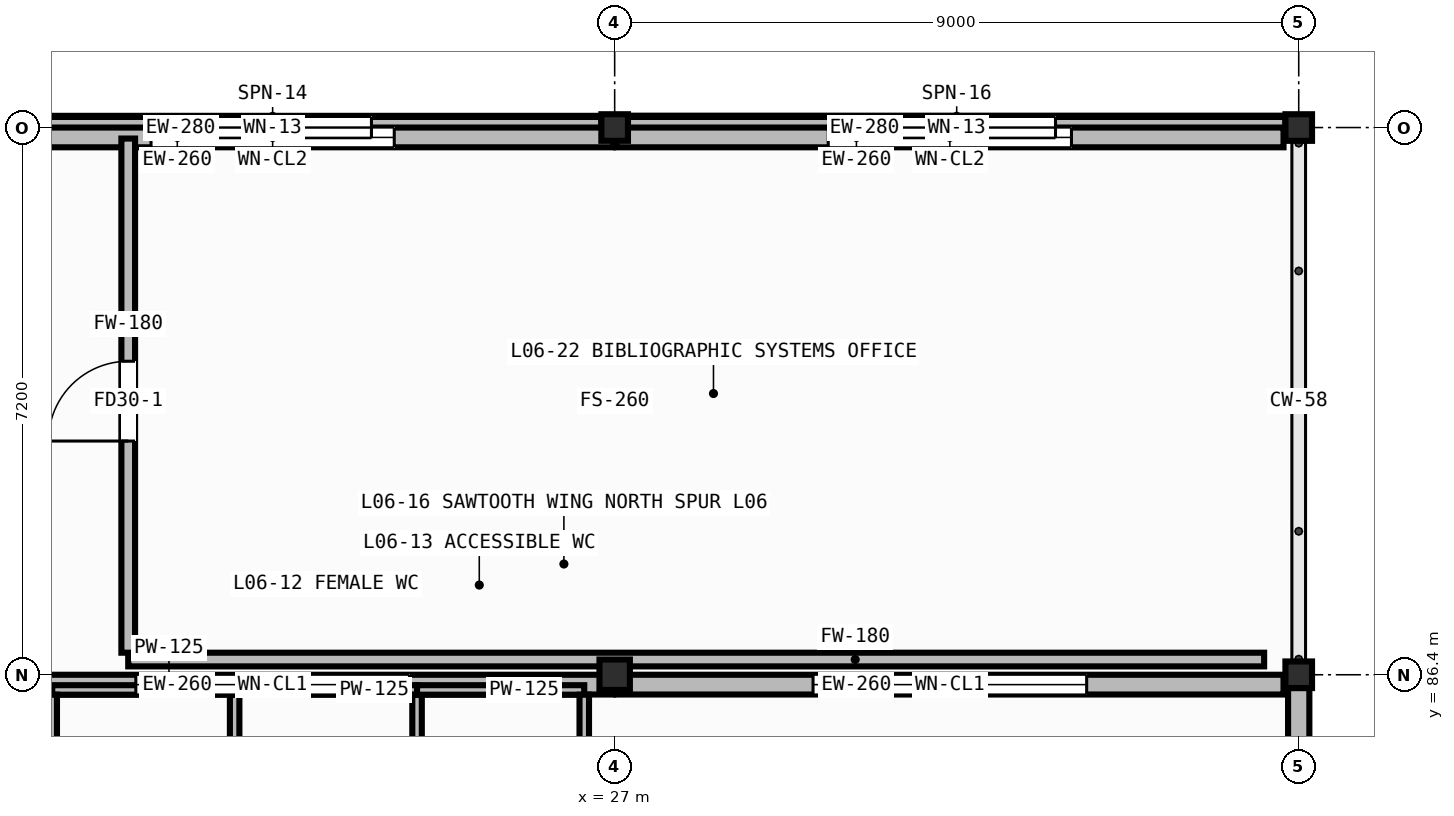
"""IFC4 building model, lengths in metres.
Left out: names, types, materials, properties, quantities, classifications, styles, units other than length and angle.
Written with IfcOpenShell. Run it as: python <this file> out.ifc"""

import sys

from ifc_helpers import new_model, si_unit, direction, frame, frame_2d, origin, origin_2d, place, context, subcontext, project, spatial, rectangle, hollow_rectangle, extrude, element, fill, save


model = new_model("IFC4")
c1 = context("Model", 3, precision=1e-05, world=origin(), true_north=direction((0.0, 1.0)))
c2 = subcontext(c1, "Body", "Model", "MODEL_VIEW")
j1 = project(units=[si_unit("LENGTHUNIT", "METRE"), si_unit("PLANEANGLEUNIT", "RADIAN")], contexts=[c1])
p1 = place(None, origin())
s1 = spatial("IfcSite", under=j1, at=p1, CompositionType="ELEMENT")
p2 = place(p1, origin())
s2 = spatial("IfcBuilding", under=s1, at=p2, CompositionType="ELEMENT")
p3 = place(p2, frame((0.0, 0.0, 20.6)))
s3 = spatial("IfcBuildingStorey", under=s2, at=p3, CompositionType="ELEMENT", Elevation=20.6)
p4 = place(p3, frame((27.0, 86.4, 0.0), z_axis=(0.0, 0.0, 1.0), x_axis=(1.0, 0.0, 0.0)))
e1 = element("IfcColumn", 1, at=p4, inside=s3, PredefinedType="COLUMN", context=c2, shape_type="SweptSolid", body=[
    extrude(hollow_rectangle(XDim=0.4, YDim=0.4, WallThickness=0.016, at=origin_2d()), origin(), (0.0, 0.0, 1.0), 3.18),
])
for number, where, z_axis, x_axis in (
    (2, (27.0, 93.6, 0.0), (0.0, 0.0, 1.0), (1.0, 0.0, 0.0)),
    (3, (36.0, 86.4, 0.0), (0.0, 0.0, 1.0), (1.0, 0.0, 0.0)),
    (4, (36.0, 93.6, 0.0), (0.0, 0.0, 1.0), (1.0, 0.0, 0.0)),
):
    element("IfcColumn", number, at=place(p3, frame(where, z_axis=z_axis, x_axis=x_axis)), inside=s3, PredefinedType="COLUMN", context=c2, shape_type="SweptSolid", body=[
        extrude(hollow_rectangle(XDim=0.35, YDim=0.35, WallThickness=0.012, at=origin_2d()), origin(), (0.0, 0.0, 1.0), 3.18),
    ])
p5 = place(p3, frame((26.825, 93.6, 0.0), z_axis=(0.0, 0.0, 1.0), x_axis=(-1.0, 0.0, 0.0)))
e5 = element("IfcWall", 5, at=p5, inside=s3, PredefinedType="STANDARD", context=c2, shape_type="SweptSolid", body=[
    extrude(rectangle(XDim=8.65, YDim=0.28, at=frame_2d((4.325, 0.0))), origin(), (0.0, 0.0, 1.0), 2.78),
])
p6 = place(p5, frame((3.025, 0.0, 0.85)))
e6 = element("IfcOpeningElement", 6, at=p6, cuts=e5, PredefinedType="OPENING", context=c2, shape_type="SweptSolid", body=[
    extrude(rectangle(XDim=2.6, YDim=1.6, at=frame_2d((1.3, 0.8))), frame((0.0, 0.152, 0.0), z_axis=(0.0, -1.0, 0.0), x_axis=(1.0, 0.0, 0.0)), (0.0, 0.0, 1.0), 0.304),
])
p7 = place(p3, frame((35.825, 93.6, 0.0), z_axis=(0.0, 0.0, 1.0), x_axis=(-1.0, 0.0, 0.0)))
e7 = element("IfcWall", 7, at=p7, inside=s3, PredefinedType="STANDARD", context=c2, shape_type="SweptSolid", body=[
    extrude(rectangle(XDim=8.65, YDim=0.28, at=frame_2d((4.325, 0.0))), origin(), (0.0, 0.0, 1.0), 2.78),
])
p8 = place(p7, frame((3.025, 0.0, 0.85)))
e8 = element("IfcOpeningElement", 8, at=p8, cuts=e7, PredefinedType="OPENING", context=c2, shape_type="SweptSolid", body=[
    extrude(rectangle(XDim=2.6, YDim=1.6, at=frame_2d((1.3, 0.8))), frame((0.0, 0.152, 0.0), z_axis=(0.0, -1.0, 0.0), x_axis=(1.0, 0.0, 0.0)), (0.0, 0.0, 1.0), 0.304),
])
p9 = place(p3, frame((36.0, 86.225, 0.0), z_axis=(0.0, 0.0, 1.0), x_axis=(0.0, -1.0, 0.0)))
e9 = element("IfcWall", 9, at=p9, inside=s3, PredefinedType="STANDARD", context=c2, shape_type="SweptSolid", body=[
    extrude(rectangle(XDim=6.85, YDim=0.28, at=frame_2d((3.425, 0.0))), origin(), (0.0, 0.0, 1.0), 2.78),
])
p10 = place(p3, frame((26.98, 86.27, 3.4), z_axis=(0.0, 0.0, 1.0), x_axis=(-1.0, 0.0, 0.0)))
e10 = element("IfcWall", 10, at=p10, inside=s3, PredefinedType="STANDARD", context=c2, shape_type="SweptSolid", body=[
    extrude(rectangle(XDim=8.96, YDim=0.26, at=frame_2d((4.48, 0.0))), origin(), (0.0, 0.0, 1.0), 2.05),
])
p11 = place(p10, frame((2.68, 0.0, 0.38)))
e11 = element("IfcOpeningElement", 11, at=p11, cuts=e10, PredefinedType="OPENING", context=c2, shape_type="SweptSolid", body=[
    extrude(rectangle(XDim=3.6, YDim=1.2, at=frame_2d((1.8, 0.6))), frame((0.0, 0.142, 0.0), z_axis=(0.0, -1.0, 0.0), x_axis=(1.0, 0.0, 0.0)), (0.0, 0.0, 1.0), 0.284),
])
p12 = place(p3, frame((35.8, 86.27, 3.4), z_axis=(0.0, 0.0, 1.0), x_axis=(-1.0, 0.0, 0.0)))
e12 = element("IfcWall", 12, at=p12, inside=s3, PredefinedType="STANDARD", context=c2, shape_type="SweptSolid", body=[
    extrude(rectangle(XDim=8.78, YDim=0.26, at=frame_2d((4.39, 0.0))), origin(), (0.0, 0.0, 1.0), 2.05),
])
p13 = place(p12, frame((2.59, 0.0, 0.38)))
e13 = element("IfcOpeningElement", 13, at=p13, cuts=e12, PredefinedType="OPENING", context=c2, shape_type="SweptSolid", body=[
    extrude(rectangle(XDim=3.6, YDim=1.2, at=frame_2d((1.8, 0.6))), frame((0.0, 0.142, 0.0), z_axis=(0.0, -1.0, 0.0), x_axis=(1.0, 0.0, 0.0)), (0.0, 0.0, 1.0), 0.284),
])
p14 = place(p3, frame((26.98, 93.47, 3.4), z_axis=(0.0, 0.0, 1.0), x_axis=(-1.0, 0.0, 0.0)))
e14 = element("IfcWall", 14, at=p14, inside=s3, PredefinedType="STANDARD", context=c2, shape_type="SweptSolid", body=[
    extrude(rectangle(XDim=8.96, YDim=0.26, at=frame_2d((4.48, 0.0))), origin(), (0.0, 0.0, 1.0), 2.05),
])
p15 = place(p14, frame((2.88, 0.0, 0.38)))
e15 = element("IfcOpeningElement", 15, at=p15, cuts=e14, PredefinedType="OPENING", context=c2, shape_type="SweptSolid", body=[
    extrude(rectangle(XDim=3.2, YDim=1.1, at=frame_2d((1.6, 0.55))), frame((0.0, 0.142, 0.0), z_axis=(0.0, -1.0, 0.0), x_axis=(1.0, 0.0, 0.0)), (0.0, 0.0, 1.0), 0.284),
])
p16 = place(p3, frame((35.8, 93.47, 3.4), z_axis=(0.0, 0.0, 1.0), x_axis=(-1.0, 0.0, 0.0)))
e16 = element("IfcWall", 16, at=p16, inside=s3, PredefinedType="STANDARD", context=c2, shape_type="SweptSolid", body=[
    extrude(rectangle(XDim=8.78, YDim=0.26, at=frame_2d((4.39, 0.0))), origin(), (0.0, 0.0, 1.0), 2.05),
])
p17 = place(p16, frame((2.79, 0.0, 0.38)))
e17 = element("IfcOpeningElement", 17, at=p17, cuts=e16, PredefinedType="OPENING", context=c2, shape_type="SweptSolid", body=[
    extrude(rectangle(XDim=3.2, YDim=1.1, at=frame_2d((1.6, 0.55))), frame((0.0, 0.142, 0.0), z_axis=(0.0, -1.0, 0.0), x_axis=(1.0, 0.0, 0.0)), (0.0, 0.0, 1.0), 0.284),
])
p18 = place(p3, frame((19.6, 86.2, 0.0), z_axis=(0.0, 0.0, 1.0), x_axis=(1.0, 0.0, 0.0)))
e18 = element("IfcWall", 18, at=p18, inside=s3, PredefinedType="PARTITIONING", context=c2, shape_type="SweptSolid", body=[
    extrude(rectangle(XDim=2.4, YDim=0.125, at=frame_2d((1.2, 0.0))), origin(), (0.0, 0.0, 1.0), 2.46),
])
for number, where, z_axis, x_axis in (
    (19, (19.6, 83.69, 0.0), (0.0, 0.0, 1.0), (0.0, 1.0, 0.0)),
    (20, (22.0, 83.69, 0.0), (0.0, 0.0, 1.0), (0.0, 1.0, 0.0)),
):
    element("IfcWall", number, at=place(p3, frame(where, z_axis=z_axis, x_axis=x_axis)), inside=s3, PredefinedType="PARTITIONING", context=c2, shape_type="SweptSolid", body=[
        extrude(rectangle(XDim=2.448, YDim=0.125, at=frame_2d((1.224, 0.0))), origin(), (0.0, 0.0, 1.0), 3.18),
    ])
p19 = place(p3, frame((22.0, 86.2, 0.0), z_axis=(0.0, 0.0, 1.0), x_axis=(1.0, 0.0, 0.0)))
e21 = element("IfcWall", 21, at=p19, inside=s3, PredefinedType="PARTITIONING", context=c2, shape_type="SweptSolid", body=[
    extrude(rectangle(XDim=2.4, YDim=0.125, at=frame_2d((1.2, 0.0))), origin(), (0.0, 0.0, 1.0), 2.46),
])
p20 = place(p3, frame((24.4, 83.69, 0.0), z_axis=(0.0, 0.0, 1.0), x_axis=(0.0, 1.0, 0.0)))
e22 = element("IfcWall", 22, at=p20, inside=s3, PredefinedType="PARTITIONING", context=c2, shape_type="SweptSolid", body=[
    extrude(rectangle(XDim=2.448, YDim=0.125, at=frame_2d((1.224, 0.0))), origin(), (0.0, 0.0, 1.0), 3.18),
])
p21 = place(p3, frame((24.4, 86.2, 0.0), z_axis=(0.0, 0.0, 1.0), x_axis=(1.0, 0.0, 0.0)))
e23 = element("IfcWall", 23, at=p21, inside=s3, PredefinedType="PARTITIONING", context=c2, shape_type="SweptSolid", body=[
    extrude(rectangle(XDim=2.2, YDim=0.125, at=frame_2d((1.1, 0.0))), origin(), (0.0, 0.0, 1.0), 2.46),
])
p22 = place(p3, frame((26.6, 83.69, 0.0), z_axis=(0.0, 0.0, 1.0), x_axis=(0.0, 1.0, 0.0)))
e24 = element("IfcWall", 24, at=p22, inside=s3, PredefinedType="PARTITIONING", context=c2, shape_type="SweptSolid", body=[
    extrude(rectangle(XDim=2.448, YDim=0.125, at=frame_2d((1.224, 0.0))), origin(), (0.0, 0.0, 1.0), 3.18),
])
p23 = place(p3, frame((20.6, 86.6, 0.0), z_axis=(0.0, 0.0, 1.0), x_axis=(1.0, 0.0, 0.0)))
e25 = element("IfcWall", 25, at=p23, inside=s3, PredefinedType="PARTITIONING", context=c2, shape_type="SweptSolid", body=[
    extrude(rectangle(XDim=14.945, YDim=0.18, at=frame_2d((7.472, 0.0))), origin(), (0.0, 0.0, 1.0), 2.46),
])
p24 = place(p3, frame((20.6, 86.69, 0.0), z_axis=(0.0, 0.0, 1.0), x_axis=(0.0, 1.0, 0.0)))
e26 = element("IfcWall", 26, at=p24, inside=s3, PredefinedType="PARTITIONING", context=c2, shape_type="SweptSolid", body=[
    extrude(rectangle(XDim=6.765, YDim=0.18, at=frame_2d((3.383, 0.0))), origin(), (0.0, 0.0, 1.0), 3.18),
])
p25 = place(p24, frame((2.785, 0.0, 0.0)))
e27 = element("IfcOpeningElement", 27, at=p25, cuts=e26, PredefinedType="OPENING", context=c2, shape_type="SweptSolid", body=[
    extrude(rectangle(XDim=1.05, YDim=2.1, at=frame_2d((0.525, 1.05))), frame((0.0, 0.102, 0.0), z_axis=(0.0, -1.0, 0.0), x_axis=(1.0, 0.0, 0.0)), (0.0, 0.0, 1.0), 0.204),
])
p26 = place(p6, origin())
e28 = element("IfcWindow", 28, at=p26, inside=s3, PartitioningType="DOUBLE_PANEL_VERTICAL", PredefinedType="WINDOW", context=c2, shape_type="SweptSolid", body=[
    extrude(rectangle(XDim=2.6, YDim=1.6, at=frame_2d((1.3, 0.8))), frame((0.0, 0.03, 0.0), z_axis=(0.0, -1.0, 0.0), x_axis=(1.0, 0.0, 0.0)), (0.0, 0.0, 1.0), 0.06),
])
fill(e6, e28)
p27 = place(p8, origin())
e29 = element("IfcWindow", 29, at=p27, inside=s3, PartitioningType="DOUBLE_PANEL_VERTICAL", PredefinedType="WINDOW", context=c2, shape_type="SweptSolid", body=[
    extrude(rectangle(XDim=2.6, YDim=1.6, at=frame_2d((1.3, 0.8))), frame((0.0, 0.03, 0.0), z_axis=(0.0, -1.0, 0.0), x_axis=(1.0, 0.0, 0.0)), (0.0, 0.0, 1.0), 0.06),
])
fill(e8, e29)
p28 = place(p11, origin())
e30 = element("IfcWindow", 30, at=p28, inside=s3, PartitioningType="DOUBLE_PANEL_VERTICAL", PredefinedType="WINDOW", context=c2, shape_type="SweptSolid", body=[
    extrude(rectangle(XDim=3.6, YDim=1.2, at=frame_2d((1.8, 0.6))), frame((0.0, 0.03, 0.0), z_axis=(0.0, -1.0, 0.0), x_axis=(1.0, 0.0, 0.0)), (0.0, 0.0, 1.0), 0.06),
])
fill(e11, e30)
p29 = place(p13, origin())
e31 = element("IfcWindow", 31, at=p29, inside=s3, PartitioningType="DOUBLE_PANEL_VERTICAL", PredefinedType="WINDOW", context=c2, shape_type="SweptSolid", body=[
    extrude(rectangle(XDim=3.6, YDim=1.2, at=frame_2d((1.8, 0.6))), frame((0.0, 0.03, 0.0), z_axis=(0.0, -1.0, 0.0), x_axis=(1.0, 0.0, 0.0)), (0.0, 0.0, 1.0), 0.06),
])
fill(e13, e31)
p30 = place(p15, origin())
e32 = element("IfcWindow", 32, at=p30, inside=s3, PartitioningType="DOUBLE_PANEL_VERTICAL", PredefinedType="WINDOW", context=c2, shape_type="SweptSolid", body=[
    extrude(rectangle(XDim=3.2, YDim=1.1, at=frame_2d((1.6, 0.55))), frame((0.0, 0.03, 0.0), z_axis=(0.0, -1.0, 0.0), x_axis=(1.0, 0.0, 0.0)), (0.0, 0.0, 1.0), 0.06),
])
fill(e15, e32)
p31 = place(p17, origin())
e33 = element("IfcWindow", 33, at=p31, inside=s3, PartitioningType="DOUBLE_PANEL_VERTICAL", PredefinedType="WINDOW", context=c2, shape_type="SweptSolid", body=[
    extrude(rectangle(XDim=3.2, YDim=1.1, at=frame_2d((1.6, 0.55))), frame((0.0, 0.03, 0.0), z_axis=(0.0, -1.0, 0.0), x_axis=(1.0, 0.0, 0.0)), (0.0, 0.0, 1.0), 0.06),
])
fill(e17, e33)
p32 = place(p25, origin())
e34 = element("IfcDoor", 34, at=p32, inside=s3, OperationType="SINGLE_SWING_LEFT", PredefinedType="DOOR", context=c2, shape_type="SweptSolid", body=[
    extrude(rectangle(XDim=1.05, YDim=2.1, at=frame_2d((0.525, 1.05))), frame((0.0, 0.025, 0.0), z_axis=(0.0, -1.0, 0.0), x_axis=(1.0, 0.0, 0.0)), (0.0, 0.0, 1.0), 0.05),
])
fill(e27, e34)
save(model, sys.argv[1])
